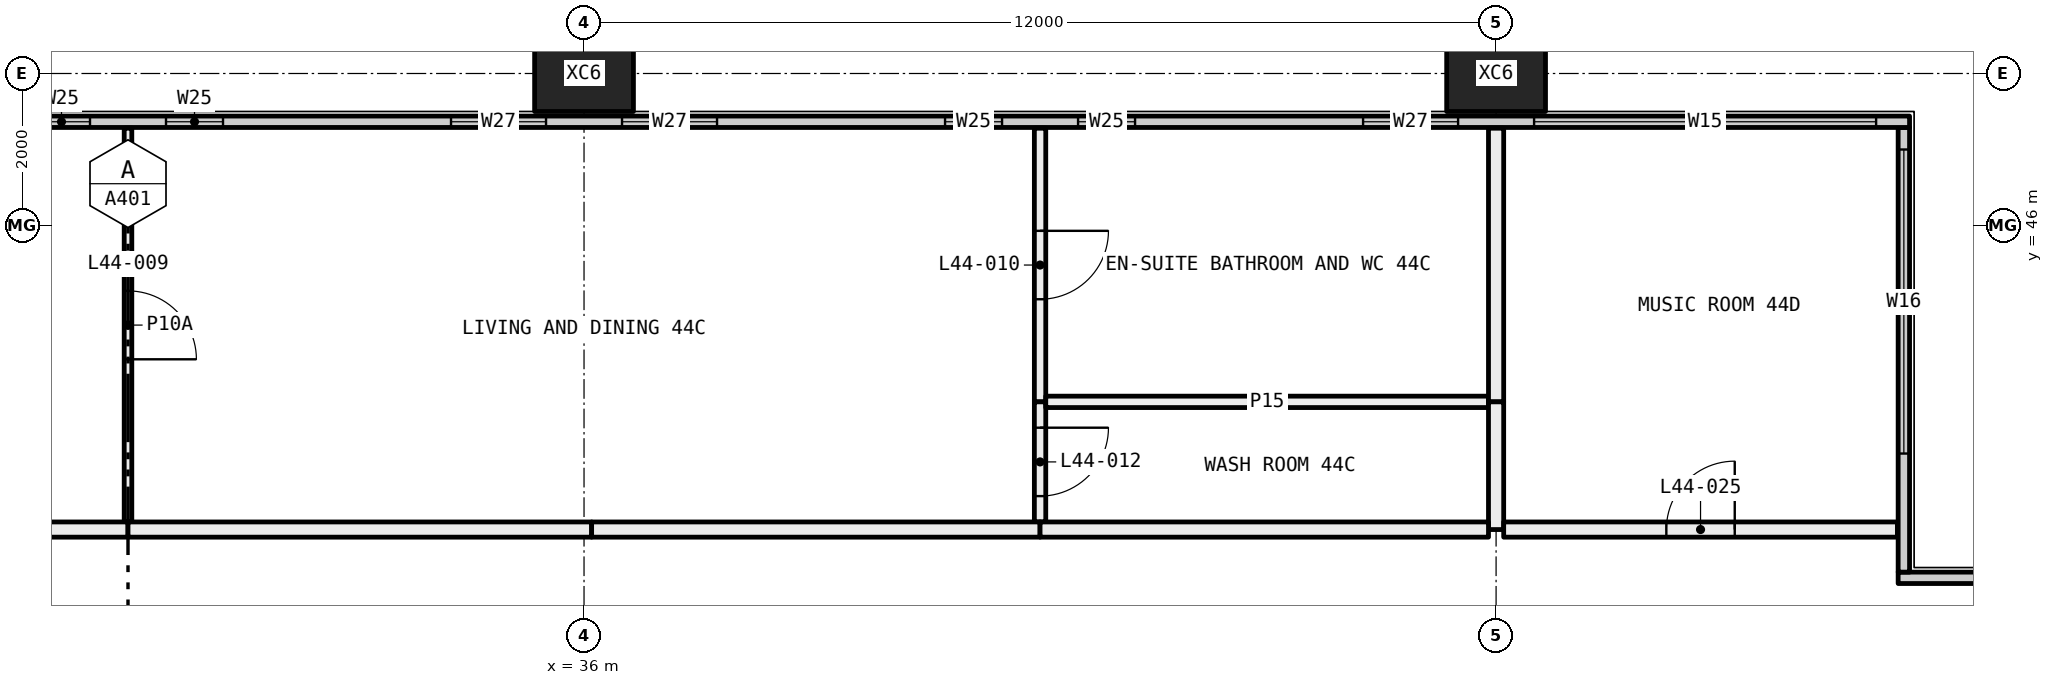
"""IFC4 building model, lengths in metres.
Left out: names, types, materials, properties, quantities, classifications, styles, units other than length and angle.
Written with IfcOpenShell. Run it as: python <this file> out.ifc"""

import sys

from ifc_helpers import new_model, si_unit, direction, frame, frame_2d, origin, origin_2d, place, context, subcontext, project, spatial, rectangle, hollow_rectangle, extrude, element, fill, save


model = new_model("IFC4")
c1 = context("Model", 3, precision=1e-05, world=origin(), true_north=direction((0.0, 1.0)))
c2 = subcontext(c1, "Body", "Model", "MODEL_VIEW")
j1 = project(units=[si_unit("LENGTHUNIT", "METRE"), si_unit("PLANEANGLEUNIT", "RADIAN")], contexts=[c1])
p1 = place(None, origin())
s1 = spatial("IfcSite", under=j1, at=p1, CompositionType="ELEMENT")
p2 = place(p1, origin())
s2 = spatial("IfcBuilding", under=s1, at=p2, CompositionType="ELEMENT")
p3 = place(p2, frame((0.0, 0.0, 168.6)))
s3 = spatial("IfcBuildingStorey", under=s2, at=p3, CompositionType="ELEMENT", Elevation=168.6)
for number, where, z_axis, x_axis in (
    (1, (36.0, 48.0, -0.4), (0.0, 0.0, 1.0), (1.0, 0.0, 0.0)),
    (2, (48.0, 48.0, -0.4), (0.0, 0.0, 1.0), (1.0, 0.0, 0.0)),
):
    element("IfcColumn", number, at=place(p3, frame(where, z_axis=z_axis, x_axis=x_axis)), inside=s3, PredefinedType="COLUMN", context=c2, shape_type="SweptSolid", body=[
        extrude(hollow_rectangle(XDim=1.3, YDim=1.0, WallThickness=0.05, at=origin_2d()), origin(), (0.0, 0.0, 1.0), 3.45),
    ])
p4 = place(p3, frame((53.29, 41.365, 0.0), z_axis=(0.0, 0.0, 1.0), x_axis=(1.0, 0.0, 0.0)))
e3 = element("IfcWall", 3, at=p4, inside=s3, PredefinedType="ELEMENTEDWALL", context=c2, shape_type="SweptSolid", body=[
    extrude(rectangle(XDim=6.15, YDim=0.15, at=frame_2d((3.075, 0.0))), origin(), (0.0, 0.0, 1.0), 3.05),
])
p5 = place(p4, frame((1.71, 0.0, 0.45)))
e4 = element("IfcOpeningElement", 4, at=p5, cuts=e3, PredefinedType="OPENING", context=c2, shape_type="SweptSolid", body=[
    extrude(rectangle(XDim=4.0, YDim=2.55, at=frame_2d((2.0, 1.275))), frame((0.0, 0.085, 0.0), z_axis=(0.0, -1.0, 0.0), x_axis=(1.0, 0.0, 0.0)), (0.0, 0.0, 1.0), 0.17),
])
p6 = place(p3, frame((53.365, 41.44, 0.0), z_axis=(0.0, 0.0, 1.0), x_axis=(0.0, 1.0, 0.0)))
e5 = element("IfcWall", 5, at=p6, inside=s3, PredefinedType="ELEMENTEDWALL", context=c2, shape_type="SweptSolid", body=[
    extrude(rectangle(XDim=5.85, YDim=0.15, at=frame_2d((2.925, 0.0))), origin(), (0.0, 0.0, 1.0), 3.05),
])
p7 = place(p6, frame((1.56, 0.0, 0.45)))
e6 = element("IfcOpeningElement", 6, at=p7, cuts=e5, PredefinedType="OPENING", context=c2, shape_type="SweptSolid", body=[
    extrude(rectangle(XDim=4.0, YDim=2.55, at=frame_2d((2.0, 1.275))), frame((0.0, 0.085, 0.0), z_axis=(0.0, -1.0, 0.0), x_axis=(1.0, 0.0, 0.0)), (0.0, 0.0, 1.0), 0.17),
])
p8 = place(p3, frame((6.56, 47.365, 0.0), z_axis=(0.0, 0.0, 1.0), x_axis=(1.0, 0.0, 0.0)))
e7 = element("IfcWall", 7, at=p8, inside=s3, PredefinedType="ELEMENTEDWALL", context=c2, shape_type="SweptSolid", body=[
    extrude(rectangle(XDim=46.88, YDim=0.15, at=frame_2d((23.44, 0.0))), origin(), (0.0, 0.0, 1.0), 3.05),
])
p9 = place(p8, frame((0.44, 0.0, 0.45)))
e8 = element("IfcOpeningElement", 8, at=p9, cuts=e7, PredefinedType="OPENING", context=c2, shape_type="SweptSolid", body=[
    extrude(rectangle(XDim=4.5, YDim=2.55, at=frame_2d((2.25, 1.275))), frame((0.0, 0.085, 0.0), z_axis=(0.0, -1.0, 0.0), x_axis=(1.0, 0.0, 0.0)), (0.0, 0.0, 1.0), 0.17),
])
p10 = place(p8, frame((5.94, 0.0, 0.45)))
e9 = element("IfcOpeningElement", 9, at=p10, cuts=e7, PredefinedType="OPENING", context=c2, shape_type="SweptSolid", body=[
    extrude(rectangle(XDim=1.25, YDim=2.55, at=frame_2d((0.625, 1.275))), frame((0.0, 0.085, 0.0), z_axis=(0.0, -1.0, 0.0), x_axis=(1.0, 0.0, 0.0)), (0.0, 0.0, 1.0), 0.17),
])
p11 = place(p8, frame((10.19, 0.0, 0.45)))
e10 = element("IfcOpeningElement", 10, at=p11, cuts=e7, PredefinedType="OPENING", context=c2, shape_type="SweptSolid", body=[
    extrude(rectangle(XDim=0.75, YDim=2.55, at=frame_2d((0.375, 1.275))), frame((0.0, 0.085, 0.0), z_axis=(0.0, -1.0, 0.0), x_axis=(1.0, 0.0, 0.0)), (0.0, 0.0, 1.0), 0.17),
])
p12 = place(p8, frame((11.94, 0.0, 0.45)))
e11 = element("IfcOpeningElement", 11, at=p12, cuts=e7, PredefinedType="OPENING", context=c2, shape_type="SweptSolid", body=[
    extrude(rectangle(XDim=0.75, YDim=2.55, at=frame_2d((0.375, 1.275))), frame((0.0, 0.085, 0.0), z_axis=(0.0, -1.0, 0.0), x_axis=(1.0, 0.0, 0.0)), (0.0, 0.0, 1.0), 0.17),
])
p13 = place(p8, frame((15.69, 0.0, 0.45)))
e12 = element("IfcOpeningElement", 12, at=p13, cuts=e7, PredefinedType="OPENING", context=c2, shape_type="SweptSolid", body=[
    extrude(rectangle(XDim=1.25, YDim=2.55, at=frame_2d((0.625, 1.275))), frame((0.0, 0.085, 0.0), z_axis=(0.0, -1.0, 0.0), x_axis=(1.0, 0.0, 0.0)), (0.0, 0.0, 1.0), 0.17),
])
p14 = place(p8, frame((17.94, 0.0, 0.45)))
e13 = element("IfcOpeningElement", 13, at=p14, cuts=e7, PredefinedType="OPENING", context=c2, shape_type="SweptSolid", body=[
    extrude(rectangle(XDim=1.25, YDim=2.55, at=frame_2d((0.625, 1.275))), frame((0.0, 0.085, 0.0), z_axis=(0.0, -1.0, 0.0), x_axis=(1.0, 0.0, 0.0)), (0.0, 0.0, 1.0), 0.17),
])
p15 = place(p8, frame((22.19, 0.0, 0.45)))
e14 = element("IfcOpeningElement", 14, at=p15, cuts=e7, PredefinedType="OPENING", context=c2, shape_type="SweptSolid", body=[
    extrude(rectangle(XDim=0.75, YDim=2.55, at=frame_2d((0.375, 1.275))), frame((0.0, 0.085, 0.0), z_axis=(0.0, -1.0, 0.0), x_axis=(1.0, 0.0, 0.0)), (0.0, 0.0, 1.0), 0.17),
])
p16 = place(p8, frame((23.94, 0.0, 0.45)))
e15 = element("IfcOpeningElement", 15, at=p16, cuts=e7, PredefinedType="OPENING", context=c2, shape_type="SweptSolid", body=[
    extrude(rectangle(XDim=0.75, YDim=2.55, at=frame_2d((0.375, 1.275))), frame((0.0, 0.085, 0.0), z_axis=(0.0, -1.0, 0.0), x_axis=(1.0, 0.0, 0.0)), (0.0, 0.0, 1.0), 0.17),
])
p17 = place(p8, frame((27.69, 0.0, 0.45)))
e16 = element("IfcOpeningElement", 16, at=p17, cuts=e7, PredefinedType="OPENING", context=c2, shape_type="SweptSolid", body=[
    extrude(rectangle(XDim=1.25, YDim=2.55, at=frame_2d((0.625, 1.275))), frame((0.0, 0.085, 0.0), z_axis=(0.0, -1.0, 0.0), x_axis=(1.0, 0.0, 0.0)), (0.0, 0.0, 1.0), 0.17),
])
p18 = place(p8, frame((29.94, 0.0, 0.45)))
e17 = element("IfcOpeningElement", 17, at=p18, cuts=e7, PredefinedType="OPENING", context=c2, shape_type="SweptSolid", body=[
    extrude(rectangle(XDim=1.25, YDim=2.55, at=frame_2d((0.625, 1.275))), frame((0.0, 0.085, 0.0), z_axis=(0.0, -1.0, 0.0), x_axis=(1.0, 0.0, 0.0)), (0.0, 0.0, 1.0), 0.17),
])
p19 = place(p8, frame((34.19, 0.0, 0.45)))
e18 = element("IfcOpeningElement", 18, at=p19, cuts=e7, PredefinedType="OPENING", context=c2, shape_type="SweptSolid", body=[
    extrude(rectangle(XDim=0.75, YDim=2.55, at=frame_2d((0.375, 1.275))), frame((0.0, 0.085, 0.0), z_axis=(0.0, -1.0, 0.0), x_axis=(1.0, 0.0, 0.0)), (0.0, 0.0, 1.0), 0.17),
])
p20 = place(p8, frame((35.94, 0.0, 0.45)))
e19 = element("IfcOpeningElement", 19, at=p20, cuts=e7, PredefinedType="OPENING", context=c2, shape_type="SweptSolid", body=[
    extrude(rectangle(XDim=0.75, YDim=2.55, at=frame_2d((0.375, 1.275))), frame((0.0, 0.085, 0.0), z_axis=(0.0, -1.0, 0.0), x_axis=(1.0, 0.0, 0.0)), (0.0, 0.0, 1.0), 0.17),
])
p21 = place(p8, frame((39.69, 0.0, 0.45)))
e20 = element("IfcOpeningElement", 20, at=p21, cuts=e7, PredefinedType="OPENING", context=c2, shape_type="SweptSolid", body=[
    extrude(rectangle(XDim=1.25, YDim=2.55, at=frame_2d((0.625, 1.275))), frame((0.0, 0.085, 0.0), z_axis=(0.0, -1.0, 0.0), x_axis=(1.0, 0.0, 0.0)), (0.0, 0.0, 1.0), 0.17),
])
p22 = place(p8, frame((41.94, 0.0, 0.45)))
e21 = element("IfcOpeningElement", 21, at=p22, cuts=e7, PredefinedType="OPENING", context=c2, shape_type="SweptSolid", body=[
    extrude(rectangle(XDim=4.5, YDim=2.55, at=frame_2d((2.25, 1.275))), frame((0.0, 0.085, 0.0), z_axis=(0.0, -1.0, 0.0), x_axis=(1.0, 0.0, 0.0)), (0.0, 0.0, 1.0), 0.17),
])
p23 = place(p3, frame((30.0, 42.1, 0.0), z_axis=(0.0, 0.0, 1.0), x_axis=(0.0, 1.0, 0.0)))
e22 = element("IfcWall", 22, at=p23, inside=s3, PredefinedType="PARTITIONING", context=c2, shape_type="SweptSolid", body=[
    extrude(rectangle(XDim=5.18, YDim=0.1, at=frame_2d((2.59, 0.0))), origin(), (0.0, 0.0, 1.0), 3.05),
])
p24 = place(p23, frame((2.14, 0.0, 0.0)))
e23 = element("IfcOpeningElement", 23, at=p24, cuts=e22, PredefinedType="OPENING", context=c2, shape_type="SweptSolid", body=[
    extrude(rectangle(XDim=0.9, YDim=2.1, at=frame_2d((0.45, 1.05))), frame((0.0, 0.06, 0.0), z_axis=(0.0, -1.0, 0.0), x_axis=(1.0, 0.0, 0.0)), (0.0, 0.0, 1.0), 0.12),
])
p25 = place(p3, frame((24.0, 42.0, 0.0), z_axis=(0.0, 0.0, 1.0), x_axis=(1.0, 0.0, 0.0)))
e24 = element("IfcWall", 24, at=p25, inside=s3, PredefinedType="PARTITIONING", context=c2, shape_type="SweptSolid", body=[
    extrude(rectangle(XDim=6.0, YDim=0.2, at=frame_2d((3.0, 0.0))), origin(), (0.0, 0.0, 1.0), 3.05),
])
p26 = place(p25, frame((2.5, 0.0, 0.0)))
e25 = element("IfcOpeningElement", 25, at=p26, cuts=e24, PredefinedType="OPENING", context=c2, shape_type="SweptSolid", body=[
    extrude(rectangle(XDim=1.0, YDim=2.1, at=frame_2d((0.5, 1.05))), frame((0.0, 0.11, 0.0), z_axis=(0.0, -1.0, 0.0), x_axis=(1.0, 0.0, 0.0)), (0.0, 0.0, 1.0), 0.22),
])
p27 = place(p3, frame((42.0, 43.68, 0.0), z_axis=(0.0, 0.0, 1.0), x_axis=(0.0, 1.0, 0.0)))
e26 = element("IfcWall", 26, at=p27, inside=s3, PredefinedType="PARTITIONING", context=c2, shape_type="SweptSolid", body=[
    extrude(rectangle(XDim=3.6, YDim=0.15, at=frame_2d((1.8, 0.0))), origin(), (0.0, 0.0, 1.0), 3.05),
])
p28 = place(p27, frame((1.35, 0.0, 0.0)))
e27 = element("IfcOpeningElement", 27, at=p28, cuts=e26, PredefinedType="OPENING", context=c2, shape_type="SweptSolid", body=[
    extrude(rectangle(XDim=0.9, YDim=2.1, at=frame_2d((0.45, 1.05))), frame((0.0, 0.085, 0.0), z_axis=(0.0, -1.0, 0.0), x_axis=(1.0, 0.0, 0.0)), (0.0, 0.0, 1.0), 0.17),
])
p29 = place(p3, frame((42.0, 42.1, 0.0), z_axis=(0.0, 0.0, 1.0), x_axis=(0.0, 1.0, 0.0)))
e28 = element("IfcWall", 28, at=p29, inside=s3, PredefinedType="PARTITIONING", context=c2, shape_type="SweptSolid", body=[
    extrude(rectangle(XDim=1.58, YDim=0.15, at=frame_2d((0.79, 0.0))), origin(), (0.0, 0.0, 1.0), 3.05),
])
p30 = place(p29, frame((0.34, 0.0, 0.0)))
e29 = element("IfcOpeningElement", 29, at=p30, cuts=e28, PredefinedType="OPENING", context=c2, shape_type="SweptSolid", body=[
    extrude(rectangle(XDim=0.9, YDim=2.1, at=frame_2d((0.45, 1.05))), frame((0.0, 0.085, 0.0), z_axis=(0.0, -1.0, 0.0), x_axis=(1.0, 0.0, 0.0)), (0.0, 0.0, 1.0), 0.17),
])
p31 = place(p3, frame((30.0, 42.0, 0.0), z_axis=(0.0, 0.0, 1.0), x_axis=(1.0, 0.0, 0.0)))
e30 = element("IfcWall", 30, at=p31, inside=s3, PredefinedType="PARTITIONING", context=c2, shape_type="SweptSolid", body=[
    extrude(rectangle(XDim=6.1, YDim=0.2, at=frame_2d((3.05, 0.0))), origin(), (0.0, 0.0, 1.0), 2.45),
])
p32 = place(p3, frame((36.1, 42.0, 0.0), z_axis=(0.0, 0.0, 1.0), x_axis=(1.0, 0.0, 0.0)))
e31 = element("IfcWall", 31, at=p32, inside=s3, PredefinedType="PARTITIONING", context=c2, shape_type="SweptSolid", body=[
    extrude(rectangle(XDim=5.9, YDim=0.2, at=frame_2d((2.95, 0.0))), origin(), (0.0, 0.0, 1.0), 3.05),
])
p33 = place(p3, frame((42.075, 43.68, 0.0), z_axis=(0.0, 0.0, 1.0), x_axis=(1.0, 0.0, 0.0)))
e32 = element("IfcWall", 32, at=p33, inside=s3, PredefinedType="PARTITIONING", context=c2, shape_type="SweptSolid", body=[
    extrude(rectangle(XDim=5.825, YDim=0.15, at=frame_2d((2.913, 0.0))), origin(), (0.0, 0.0, 1.0), 3.05),
])
p34 = place(p3, frame((48.0, 43.68, 0.0), z_axis=(0.0, 0.0, 1.0), x_axis=(0.0, 1.0, 0.0)))
e33 = element("IfcWall", 33, at=p34, inside=s3, PredefinedType="PARTITIONING", context=c2, shape_type="SweptSolid", body=[
    extrude(rectangle(XDim=3.6, YDim=0.2, at=frame_2d((1.8, 0.0))), origin(), (0.0, 0.0, 1.0), 3.05),
])
p35 = place(p3, frame((48.0, 42.0, 0.0), z_axis=(0.0, 0.0, 1.0), x_axis=(0.0, 1.0, 0.0)))
e34 = element("IfcWall", 34, at=p35, inside=s3, PredefinedType="PARTITIONING", context=c2, shape_type="SweptSolid", body=[
    extrude(rectangle(XDim=1.68, YDim=0.2, at=frame_2d((0.84, 0.0))), origin(), (0.0, 0.0, 1.0), 3.05),
])
p36 = place(p3, frame((42.0, 42.0, 0.0), z_axis=(0.0, 0.0, 1.0), x_axis=(1.0, 0.0, 0.0)))
e35 = element("IfcWall", 35, at=p36, inside=s3, PredefinedType="PARTITIONING", context=c2, shape_type="SweptSolid", body=[
    extrude(rectangle(XDim=5.9, YDim=0.2, at=frame_2d((2.95, 0.0))), origin(), (0.0, 0.0, 1.0), 3.05),
])
p37 = place(p3, frame((48.1, 42.0, 0.0), z_axis=(0.0, 0.0, 1.0), x_axis=(1.0, 0.0, 0.0)))
e36 = element("IfcWall", 36, at=p37, inside=s3, PredefinedType="PARTITIONING", context=c2, shape_type="SweptSolid", body=[
    extrude(rectangle(XDim=5.18, YDim=0.2, at=frame_2d((2.59, 0.0))), origin(), (0.0, 0.0, 1.0), 3.05),
])
p38 = place(p37, frame((2.14, 0.0, 0.0)))
e37 = element("IfcOpeningElement", 37, at=p38, cuts=e36, PredefinedType="OPENING", context=c2, shape_type="SweptSolid", body=[
    extrude(rectangle(XDim=0.9, YDim=2.1, at=frame_2d((0.45, 1.05))), frame((0.0, 0.11, 0.0), z_axis=(0.0, -1.0, 0.0), x_axis=(1.0, 0.0, 0.0)), (0.0, 0.0, 1.0), 0.22),
])
p39 = place(p7, origin())
e38 = element("IfcWindow", 38, at=p39, inside=s3, PartitioningType="SINGLE_PANEL", PredefinedType="WINDOW", context=c2, shape_type="SweptSolid", body=[
    extrude(rectangle(XDim=4.0, YDim=2.55, at=frame_2d((2.0, 1.275))), frame((0.0, 0.03, 0.0), z_axis=(0.0, -1.0, 0.0), x_axis=(1.0, 0.0, 0.0)), (0.0, 0.0, 1.0), 0.06),
])
fill(e6, e38)
p40 = place(p15, origin())
e39 = element("IfcWindow", 39, at=p40, inside=s3, PartitioningType="SINGLE_PANEL", PredefinedType="WINDOW", context=c2, shape_type="SweptSolid", body=[
    extrude(rectangle(XDim=0.75, YDim=2.55, at=frame_2d((0.375, 1.275))), frame((0.0, 0.03, 0.0), z_axis=(0.0, -1.0, 0.0), x_axis=(1.0, 0.0, 0.0)), (0.0, 0.0, 1.0), 0.06),
])
fill(e14, e39)
p41 = place(p16, origin())
e40 = element("IfcWindow", 40, at=p41, inside=s3, PartitioningType="SINGLE_PANEL", PredefinedType="WINDOW", context=c2, shape_type="SweptSolid", body=[
    extrude(rectangle(XDim=0.75, YDim=2.55, at=frame_2d((0.375, 1.275))), frame((0.0, 0.03, 0.0), z_axis=(0.0, -1.0, 0.0), x_axis=(1.0, 0.0, 0.0)), (0.0, 0.0, 1.0), 0.06),
])
fill(e15, e40)
p42 = place(p17, origin())
e41 = element("IfcWindow", 41, at=p42, inside=s3, PartitioningType="SINGLE_PANEL", PredefinedType="WINDOW", context=c2, shape_type="SweptSolid", body=[
    extrude(rectangle(XDim=1.25, YDim=2.55, at=frame_2d((0.625, 1.275))), frame((0.0, 0.03, 0.0), z_axis=(0.0, -1.0, 0.0), x_axis=(1.0, 0.0, 0.0)), (0.0, 0.0, 1.0), 0.06),
])
fill(e16, e41)
p43 = place(p18, origin())
e42 = element("IfcWindow", 42, at=p43, inside=s3, PartitioningType="SINGLE_PANEL", PredefinedType="WINDOW", context=c2, shape_type="SweptSolid", body=[
    extrude(rectangle(XDim=1.25, YDim=2.55, at=frame_2d((0.625, 1.275))), frame((0.0, 0.03, 0.0), z_axis=(0.0, -1.0, 0.0), x_axis=(1.0, 0.0, 0.0)), (0.0, 0.0, 1.0), 0.06),
])
fill(e17, e42)
p44 = place(p19, origin())
e43 = element("IfcWindow", 43, at=p44, inside=s3, PartitioningType="SINGLE_PANEL", PredefinedType="WINDOW", context=c2, shape_type="SweptSolid", body=[
    extrude(rectangle(XDim=0.75, YDim=2.55, at=frame_2d((0.375, 1.275))), frame((0.0, 0.03, 0.0), z_axis=(0.0, -1.0, 0.0), x_axis=(1.0, 0.0, 0.0)), (0.0, 0.0, 1.0), 0.06),
])
fill(e18, e43)
p45 = place(p20, origin())
e44 = element("IfcWindow", 44, at=p45, inside=s3, PartitioningType="SINGLE_PANEL", PredefinedType="WINDOW", context=c2, shape_type="SweptSolid", body=[
    extrude(rectangle(XDim=0.75, YDim=2.55, at=frame_2d((0.375, 1.275))), frame((0.0, 0.03, 0.0), z_axis=(0.0, -1.0, 0.0), x_axis=(1.0, 0.0, 0.0)), (0.0, 0.0, 1.0), 0.06),
])
fill(e19, e44)
p46 = place(p21, origin())
e45 = element("IfcWindow", 45, at=p46, inside=s3, PartitioningType="SINGLE_PANEL", PredefinedType="WINDOW", context=c2, shape_type="SweptSolid", body=[
    extrude(rectangle(XDim=1.25, YDim=2.55, at=frame_2d((0.625, 1.275))), frame((0.0, 0.03, 0.0), z_axis=(0.0, -1.0, 0.0), x_axis=(1.0, 0.0, 0.0)), (0.0, 0.0, 1.0), 0.06),
])
fill(e20, e45)
p47 = place(p22, origin())
e46 = element("IfcWindow", 46, at=p47, inside=s3, PartitioningType="SINGLE_PANEL", PredefinedType="WINDOW", context=c2, shape_type="SweptSolid", body=[
    extrude(rectangle(XDim=4.5, YDim=2.55, at=frame_2d((2.25, 1.275))), frame((0.0, 0.03, 0.0), z_axis=(0.0, -1.0, 0.0), x_axis=(1.0, 0.0, 0.0)), (0.0, 0.0, 1.0), 0.06),
])
fill(e21, e46)
p48 = place(p24, frame((0.9, 0.0, 0.0), x_axis=(-1.0, 0.0, 0.0)))
e47 = element("IfcDoor", 47, at=p48, inside=s3, OperationType="SINGLE_SWING_LEFT", PredefinedType="DOOR", context=c2, shape_type="SweptSolid", body=[
    extrude(rectangle(XDim=0.9, YDim=2.1, at=frame_2d((0.45, 1.05))), frame((0.0, 0.025, 0.0), z_axis=(0.0, -1.0, 0.0), x_axis=(1.0, 0.0, 0.0)), (0.0, 0.0, 1.0), 0.05),
])
fill(e23, e47)
p49 = place(p28, frame((0.9, 0.0, 0.0), x_axis=(-1.0, 0.0, 0.0)))
e48 = element("IfcDoor", 48, at=p49, inside=s3, OperationType="SINGLE_SWING_RIGHT", PredefinedType="DOOR", context=c2, shape_type="SweptSolid", body=[
    extrude(rectangle(XDim=0.9, YDim=2.1, at=frame_2d((0.45, 1.05))), frame((0.0, 0.025, 0.0), z_axis=(0.0, -1.0, 0.0), x_axis=(1.0, 0.0, 0.0)), (0.0, 0.0, 1.0), 0.05),
])
fill(e27, e48)
p50 = place(p30, frame((0.9, 0.0, 0.0), x_axis=(-1.0, 0.0, 0.0)))
e49 = element("IfcDoor", 49, at=p50, inside=s3, OperationType="SINGLE_SWING_RIGHT", PredefinedType="DOOR", context=c2, shape_type="SweptSolid", body=[
    extrude(rectangle(XDim=0.9, YDim=2.1, at=frame_2d((0.45, 1.05))), frame((0.0, 0.025, 0.0), z_axis=(0.0, -1.0, 0.0), x_axis=(1.0, 0.0, 0.0)), (0.0, 0.0, 1.0), 0.05),
])
fill(e29, e49)
p51 = place(p38, origin())
e50 = element("IfcDoor", 50, at=p51, inside=s3, OperationType="SINGLE_SWING_LEFT", PredefinedType="DOOR", context=c2, shape_type="SweptSolid", body=[
    extrude(rectangle(XDim=0.9, YDim=2.1, at=frame_2d((0.45, 1.05))), frame((0.0, 0.025, 0.0), z_axis=(0.0, -1.0, 0.0), x_axis=(1.0, 0.0, 0.0)), (0.0, 0.0, 1.0), 0.05),
])
fill(e37, e50)
save(model, sys.argv[1])
